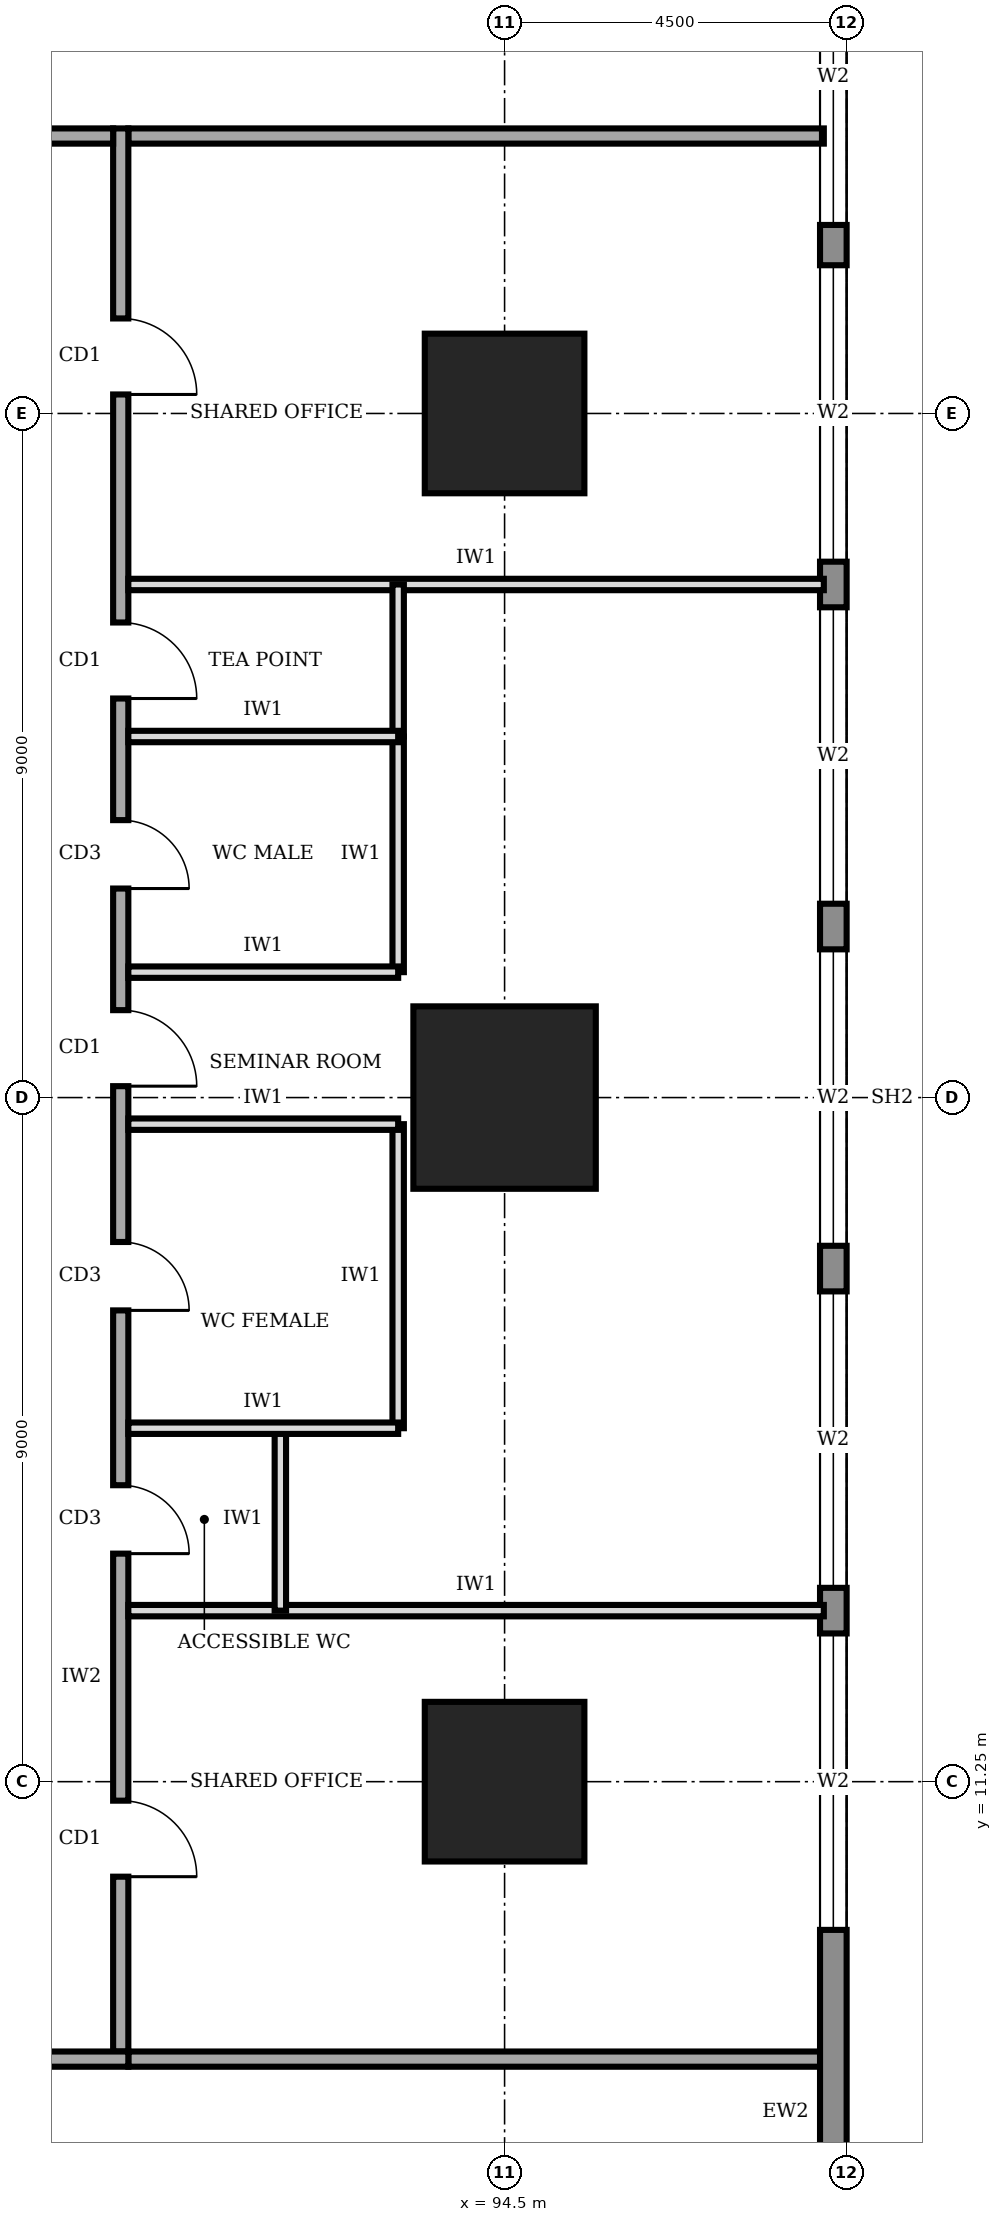
"""IFC4 building model, lengths in metres.
Left out: names, types, materials, properties, quantities, classifications, styles, units other than length and angle.
Written with IfcOpenShell. Run it as: python <this file> out.ifc"""

import sys

from ifc_helpers import new_model, si_unit, direction, frame, frame_2d, origin, origin_2d, place, context, subcontext, project, spatial, rectangle, extrude, element, fill, save


model = new_model("IFC4")
c1 = context("Model", 3, precision=1e-05, world=origin(), true_north=direction((0.0, 1.0)))
c2 = subcontext(c1, "Body", "Model", "MODEL_VIEW")
j1 = project(units=[si_unit("LENGTHUNIT", "METRE"), si_unit("PLANEANGLEUNIT", "RADIAN")], contexts=[c1])
p1 = place(None, origin())
s1 = spatial("IfcSite", under=j1, at=p1, CompositionType="ELEMENT")
p2 = place(p1, origin())
s2 = spatial("IfcBuilding", under=s1, at=p2, CompositionType="ELEMENT")
p3 = place(p2, frame((0.0, 0.0, 65.0)))
s3 = spatial("IfcBuildingStorey", under=s2, at=p3, CompositionType="ELEMENT", Elevation=65.0)
p4 = place(p3, frame((94.5, 11.25, 0.0), z_axis=(0.0, 0.0, 1.0), x_axis=(1.0, 0.0, 0.0)))
e1 = element("IfcColumn", 1, at=p4, inside=s3, PredefinedType="COLUMN", context=c2, shape_type="SweptSolid", body=[
    extrude(rectangle(XDim=2.1, YDim=2.1, at=origin_2d()), origin(), (0.0, 0.0, 1.0), 4.0),
])
p5 = place(p3, frame((94.5, 20.25, 0.0), z_axis=(0.0, 0.0, 1.0), x_axis=(1.0, 0.0, 0.0)))
e2 = element("IfcColumn", 2, at=p5, inside=s3, PredefinedType="COLUMN", context=c2, shape_type="SweptSolid", body=[
    extrude(rectangle(XDim=2.4, YDim=2.4, at=origin_2d()), origin(), (0.0, 0.0, 1.0), 4.0),
])
p6 = place(p3, frame((94.5, 29.25, 0.0), z_axis=(0.0, 0.0, 1.0), x_axis=(1.0, 0.0, 0.0)))
e3 = element("IfcColumn", 3, at=p6, inside=s3, PredefinedType="COLUMN", context=c2, shape_type="SweptSolid", body=[
    extrude(rectangle(XDim=2.1, YDim=2.1, at=origin_2d()), origin(), (0.0, 0.0, 1.0), 4.0),
])
p7 = place(p3, frame((98.825, 4.52, 0.0), z_axis=(0.0, 0.0, 1.0), x_axis=(0.0, 1.0, 0.0)))
e4 = element("IfcWall", 4, at=p7, inside=s3, PredefinedType="STANDARD", context=c2, shape_type="SweptSolid", body=[
    extrude(rectangle(XDim=31.46, YDim=0.35, at=frame_2d((15.73, 0.0))), origin(), (0.0, 0.0, 1.0), 3.75),
])
p8 = place(p7, frame((4.78, 0.0, 0.6)))
e5 = element("IfcOpeningElement", 5, at=p8, cuts=e4, PredefinedType="OPENING", context=c2, shape_type="SweptSolid", body=[
    extrude(rectangle(XDim=3.9, YDim=2.6, at=frame_2d((1.95, 1.3))), frame((0.0, 0.185, 0.0), z_axis=(0.0, -1.0, 0.0), x_axis=(1.0, 0.0, 0.0)), (0.0, 0.0, 1.0), 0.37),
])
p9 = place(p7, frame((9.28, 0.0, 0.6)))
e6 = element("IfcOpeningElement", 6, at=p9, cuts=e4, PredefinedType="OPENING", context=c2, shape_type="SweptSolid", body=[
    extrude(rectangle(XDim=3.9, YDim=2.6, at=frame_2d((1.95, 1.3))), frame((0.0, 0.185, 0.0), z_axis=(0.0, -1.0, 0.0), x_axis=(1.0, 0.0, 0.0)), (0.0, 0.0, 1.0), 0.37),
])
p10 = place(p7, frame((13.78, 0.0, 0.6)))
e7 = element("IfcOpeningElement", 7, at=p10, cuts=e4, PredefinedType="OPENING", context=c2, shape_type="SweptSolid", body=[
    extrude(rectangle(XDim=3.9, YDim=2.6, at=frame_2d((1.95, 1.3))), frame((0.0, 0.185, 0.0), z_axis=(0.0, -1.0, 0.0), x_axis=(1.0, 0.0, 0.0)), (0.0, 0.0, 1.0), 0.37),
])
p11 = place(p7, frame((18.28, 0.0, 0.6)))
e8 = element("IfcOpeningElement", 8, at=p11, cuts=e4, PredefinedType="OPENING", context=c2, shape_type="SweptSolid", body=[
    extrude(rectangle(XDim=3.9, YDim=2.6, at=frame_2d((1.95, 1.3))), frame((0.0, 0.185, 0.0), z_axis=(0.0, -1.0, 0.0), x_axis=(1.0, 0.0, 0.0)), (0.0, 0.0, 1.0), 0.37),
])
p12 = place(p7, frame((22.78, 0.0, 0.6)))
e9 = element("IfcOpeningElement", 9, at=p12, cuts=e4, PredefinedType="OPENING", context=c2, shape_type="SweptSolid", body=[
    extrude(rectangle(XDim=3.9, YDim=2.6, at=frame_2d((1.95, 1.3))), frame((0.0, 0.185, 0.0), z_axis=(0.0, -1.0, 0.0), x_axis=(1.0, 0.0, 0.0)), (0.0, 0.0, 1.0), 0.37),
])
p13 = place(p7, frame((27.21, 0.0, 0.6)))
e10 = element("IfcOpeningElement", 10, at=p13, cuts=e4, PredefinedType="OPENING", context=c2, shape_type="SweptSolid", body=[
    extrude(rectangle(XDim=3.9, YDim=2.6, at=frame_2d((1.95, 1.3))), frame((0.0, 0.185, 0.0), z_axis=(0.0, -1.0, 0.0), x_axis=(1.0, 0.0, 0.0)), (0.0, 0.0, 1.0), 0.37),
])
p14 = place(p3, frame((72.65, 7.6, 0.0), z_axis=(0.0, 0.0, 1.0), x_axis=(1.0, 0.0, 0.0)))
e11 = element("IfcWall", 11, at=p14, inside=s3, PredefinedType="SOLIDWALL", context=c2, shape_type="SweptSolid", body=[
    extrude(rectangle(XDim=16.9, YDim=0.2, at=frame_2d((8.45, 0.0))), origin(), (0.0, 0.0, 1.0), 3.75),
])
p15 = place(p14, frame((3.175, 0.0, 0.0)))
e12 = element("IfcOpeningElement", 12, at=p15, cuts=e11, PredefinedType="OPENING", context=c2, shape_type="SweptSolid", body=[
    extrude(rectangle(XDim=1.8, YDim=2.1, at=frame_2d((0.9, 1.05))), frame((0.0, 0.11, 0.0), z_axis=(0.0, -1.0, 0.0), x_axis=(1.0, 0.0, 0.0)), (0.0, 0.0, 1.0), 0.22),
])
p16 = place(p14, frame((10.1, 0.0, 0.0)))
e13 = element("IfcOpeningElement", 13, at=p16, cuts=e11, PredefinedType="OPENING", context=c2, shape_type="SweptSolid", body=[
    extrude(rectangle(XDim=1.0, YDim=2.1, at=frame_2d((0.5, 1.05))), frame((0.0, 0.11, 0.0), z_axis=(0.0, -1.0, 0.0), x_axis=(1.0, 0.0, 0.0)), (0.0, 0.0, 1.0), 0.22),
])
p17 = place(p14, frame((14.375, 0.0, 0.0)))
e14 = element("IfcOpeningElement", 14, at=p17, cuts=e11, PredefinedType="OPENING", context=c2, shape_type="SweptSolid", body=[
    extrude(rectangle(XDim=1.0, YDim=2.1, at=frame_2d((0.5, 1.05))), frame((0.0, 0.11, 0.0), z_axis=(0.0, -1.0, 0.0), x_axis=(1.0, 0.0, 0.0)), (0.0, 0.0, 1.0), 0.22),
])
p18 = place(p3, frame((89.45, 7.7, 0.0), z_axis=(0.0, 0.0, 1.0), x_axis=(0.0, 1.0, 0.0)))
e15 = element("IfcWall", 15, at=p18, inside=s3, PredefinedType="SOLIDWALL", context=c2, shape_type="SweptSolid", body=[
    extrude(rectangle(XDim=25.3, YDim=0.2, at=frame_2d((12.65, 0.0))), origin(), (0.0, 0.0, 1.0), 3.75),
])
p19 = place(p18, frame((2.3, 0.0, 0.0)))
e16 = element("IfcOpeningElement", 16, at=p19, cuts=e15, PredefinedType="OPENING", context=c2, shape_type="SweptSolid", body=[
    extrude(rectangle(XDim=1.0, YDim=2.1, at=frame_2d((0.5, 1.05))), frame((0.0, 0.11, 0.0), z_axis=(0.0, -1.0, 0.0), x_axis=(1.0, 0.0, 0.0)), (0.0, 0.0, 1.0), 0.22),
])
p20 = place(p18, frame((6.55, 0.0, 0.0)))
e17 = element("IfcOpeningElement", 17, at=p20, cuts=e15, PredefinedType="OPENING", context=c2, shape_type="SweptSolid", body=[
    extrude(rectangle(XDim=0.9, YDim=2.1, at=frame_2d((0.45, 1.05))), frame((0.0, 0.11, 0.0), z_axis=(0.0, -1.0, 0.0), x_axis=(1.0, 0.0, 0.0)), (0.0, 0.0, 1.0), 0.22),
])
p21 = place(p18, frame((9.75, 0.0, 0.0)))
e18 = element("IfcOpeningElement", 18, at=p21, cuts=e15, PredefinedType="OPENING", context=c2, shape_type="SweptSolid", body=[
    extrude(rectangle(XDim=0.9, YDim=2.1, at=frame_2d((0.45, 1.05))), frame((0.0, 0.11, 0.0), z_axis=(0.0, -1.0, 0.0), x_axis=(1.0, 0.0, 0.0)), (0.0, 0.0, 1.0), 0.22),
])
p22 = place(p18, frame((15.3, 0.0, 0.0)))
e19 = element("IfcOpeningElement", 19, at=p22, cuts=e15, PredefinedType="OPENING", context=c2, shape_type="SweptSolid", body=[
    extrude(rectangle(XDim=0.9, YDim=2.1, at=frame_2d((0.45, 1.05))), frame((0.0, 0.11, 0.0), z_axis=(0.0, -1.0, 0.0), x_axis=(1.0, 0.0, 0.0)), (0.0, 0.0, 1.0), 0.22),
])
p23 = place(p18, frame((17.8, 0.0, 0.0)))
e20 = element("IfcOpeningElement", 20, at=p23, cuts=e15, PredefinedType="OPENING", context=c2, shape_type="SweptSolid", body=[
    extrude(rectangle(XDim=1.0, YDim=2.1, at=frame_2d((0.5, 1.05))), frame((0.0, 0.11, 0.0), z_axis=(0.0, -1.0, 0.0), x_axis=(1.0, 0.0, 0.0)), (0.0, 0.0, 1.0), 0.22),
])
p24 = place(p18, frame((12.7, 0.0, 0.0)))
e21 = element("IfcOpeningElement", 21, at=p24, cuts=e15, PredefinedType="OPENING", context=c2, shape_type="SweptSolid", body=[
    extrude(rectangle(XDim=1.0, YDim=2.1, at=frame_2d((0.5, 1.05))), frame((0.0, 0.11, 0.0), z_axis=(0.0, -1.0, 0.0), x_axis=(1.0, 0.0, 0.0)), (0.0, 0.0, 1.0), 0.22),
])
p25 = place(p18, frame((21.8, 0.0, 0.0)))
e22 = element("IfcOpeningElement", 22, at=p25, cuts=e15, PredefinedType="OPENING", context=c2, shape_type="SweptSolid", body=[
    extrude(rectangle(XDim=1.0, YDim=2.1, at=frame_2d((0.5, 1.05))), frame((0.0, 0.11, 0.0), z_axis=(0.0, -1.0, 0.0), x_axis=(1.0, 0.0, 0.0)), (0.0, 0.0, 1.0), 0.22),
])
p26 = place(p3, frame((89.35, 32.9, 0.0), z_axis=(0.0, 0.0, 1.0), x_axis=(-1.0, 0.0, 0.0)))
e23 = element("IfcWall", 23, at=p26, inside=s3, PredefinedType="SOLIDWALL", context=c2, shape_type="SweptSolid", body=[
    extrude(rectangle(XDim=16.9, YDim=0.2, at=frame_2d((8.45, 0.0))), origin(), (0.0, 0.0, 1.0), 3.75),
])
p27 = place(p26, frame((14.375, 0.0, 0.0)))
e24 = element("IfcOpeningElement", 24, at=p27, cuts=e23, PredefinedType="OPENING", context=c2, shape_type="SweptSolid", body=[
    extrude(rectangle(XDim=1.0, YDim=2.1, at=frame_2d((0.5, 1.05))), frame((0.0, 0.11, 0.0), z_axis=(0.0, -1.0, 0.0), x_axis=(1.0, 0.0, 0.0)), (0.0, 0.0, 1.0), 0.22),
])
p28 = place(p26, frame((7.85, 0.0, 0.0)))
e25 = element("IfcOpeningElement", 25, at=p28, cuts=e23, PredefinedType="OPENING", context=c2, shape_type="SweptSolid", body=[
    extrude(rectangle(XDim=1.0, YDim=2.1, at=frame_2d((0.5, 1.05))), frame((0.0, 0.11, 0.0), z_axis=(0.0, -1.0, 0.0), x_axis=(1.0, 0.0, 0.0)), (0.0, 0.0, 1.0), 0.22),
])
p29 = place(p26, frame((1.325, 0.0, 0.0)))
e26 = element("IfcOpeningElement", 26, at=p29, cuts=e23, PredefinedType="OPENING", context=c2, shape_type="SweptSolid", body=[
    extrude(rectangle(XDim=1.0, YDim=2.1, at=frame_2d((0.5, 1.05))), frame((0.0, 0.11, 0.0), z_axis=(0.0, -1.0, 0.0), x_axis=(1.0, 0.0, 0.0)), (0.0, 0.0, 1.0), 0.22),
])
for number, where, z_axis, x_axis in (
    (27, (89.55, 7.6, 0.0), (0.0, 0.0, 1.0), (1.0, 0.0, 0.0)),
    (28, (89.55, 32.9, 0.0), (0.0, 0.0, 1.0), (1.0, 0.0, 0.0)),
):
    element("IfcWall", number, at=place(p3, frame(where, z_axis=z_axis, x_axis=x_axis)), inside=s3, PredefinedType="SOLIDWALL", context=c2, shape_type="SweptSolid", body=[
        extrude(rectangle(XDim=9.15, YDim=0.2, at=frame_2d((4.575, 0.0))), origin(), (0.0, 0.0, 1.0), 3.75),
    ])
for number, where, z_axis, x_axis in (
    (29, (89.55, 13.5, 0.0), (0.0, 0.0, 1.0), (1.0, 0.0, 0.0)),
    (30, (89.55, 27.0, 0.0), (0.0, 0.0, 1.0), (1.0, 0.0, 0.0)),
):
    element("IfcWall", number, at=place(p3, frame(where, z_axis=z_axis, x_axis=x_axis)), inside=s3, PredefinedType="PARTITIONING", context=c2, shape_type="SweptSolid", body=[
        extrude(rectangle(XDim=9.15, YDim=0.15, at=frame_2d((4.575, 0.0))), origin(), (0.0, 0.0, 1.0), 3.75),
    ])
p30 = place(p3, frame((89.55, 15.9, 0.0), z_axis=(0.0, 0.0, 1.0), x_axis=(1.0, 0.0, 0.0)))
e31 = element("IfcWall", 31, at=p30, inside=s3, PredefinedType="PARTITIONING", context=c2, shape_type="SweptSolid", body=[
    extrude(rectangle(XDim=3.55, YDim=0.15, at=frame_2d((1.775, 0.0))), origin(), (0.0, 0.0, 1.0), 3.75),
])
p31 = place(p3, frame((89.55, 19.9, 0.0), z_axis=(0.0, 0.0, 1.0), x_axis=(1.0, 0.0, 0.0)))
e32 = element("IfcWall", 32, at=p31, inside=s3, PredefinedType="PARTITIONING", context=c2, shape_type="SweptSolid", body=[
    extrude(rectangle(XDim=3.55, YDim=0.15, at=frame_2d((1.775, 0.0))), origin(), (0.0, 0.0, 1.0), 2.85),
])
for number, where, z_axis, x_axis in (
    (33, (89.55, 21.9, 0.0), (0.0, 0.0, 1.0), (1.0, 0.0, 0.0)),
    (34, (89.55, 25.0, 0.0), (0.0, 0.0, 1.0), (1.0, 0.0, 0.0)),
):
    element("IfcWall", number, at=place(p3, frame(where, z_axis=z_axis, x_axis=x_axis)), inside=s3, PredefinedType="PARTITIONING", context=c2, shape_type="SweptSolid", body=[
        extrude(rectangle(XDim=3.55, YDim=0.15, at=frame_2d((1.775, 0.0))), origin(), (0.0, 0.0, 1.0), 3.75),
    ])
p32 = place(p3, frame((91.55, 13.5, 0.0), z_axis=(0.0, 0.0, 1.0), x_axis=(0.0, 1.0, 0.0)))
e35 = element("IfcWall", 35, at=p32, inside=s3, PredefinedType="PARTITIONING", context=c2, shape_type="SweptSolid", body=[
    extrude(rectangle(XDim=2.4, YDim=0.15, at=frame_2d((1.2, 0.0))), origin(), (0.0, 0.0, 1.0), 3.75),
])
p33 = place(p3, frame((93.1, 15.9, 0.0), z_axis=(0.0, 0.0, 1.0), x_axis=(0.0, 1.0, 0.0)))
e36 = element("IfcWall", 36, at=p33, inside=s3, PredefinedType="PARTITIONING", context=c2, shape_type="SweptSolid", body=[
    extrude(rectangle(XDim=4.0, YDim=0.15, at=frame_2d((2.0, 0.0))), origin(), (0.0, 0.0, 1.0), 3.75),
])
p34 = place(p3, frame((93.1, 21.9, 0.0), z_axis=(0.0, 0.0, 1.0), x_axis=(0.0, 1.0, 0.0)))
e37 = element("IfcWall", 37, at=p34, inside=s3, PredefinedType="PARTITIONING", context=c2, shape_type="SweptSolid", body=[
    extrude(rectangle(XDim=3.1, YDim=0.15, at=frame_2d((1.55, 0.0))), origin(), (0.0, 0.0, 1.0), 3.75),
])
p35 = place(p3, frame((93.1, 25.0, 0.0), z_axis=(0.0, 0.0, 1.0), x_axis=(0.0, 1.0, 0.0)))
e38 = element("IfcWall", 38, at=p35, inside=s3, PredefinedType="PARTITIONING", context=c2, shape_type="SweptSolid", body=[
    extrude(rectangle(XDim=2.0, YDim=0.15, at=frame_2d((1.0, 0.0))), origin(), (0.0, 0.0, 1.0), 3.75),
])
p36 = place(p8, origin())
e39 = element("IfcWindow", 39, at=p36, inside=s3, PartitioningType="SINGLE_PANEL", PredefinedType="WINDOW", context=c2, shape_type="SweptSolid", body=[
    extrude(rectangle(XDim=3.9, YDim=2.6, at=frame_2d((1.95, 1.3))), frame((0.0, 0.03, 0.0), z_axis=(0.0, -1.0, 0.0), x_axis=(1.0, 0.0, 0.0)), (0.0, 0.0, 1.0), 0.06),
])
fill(e5, e39)
p37 = place(p9, origin())
e40 = element("IfcWindow", 40, at=p37, inside=s3, PartitioningType="SINGLE_PANEL", PredefinedType="WINDOW", context=c2, shape_type="SweptSolid", body=[
    extrude(rectangle(XDim=3.9, YDim=2.6, at=frame_2d((1.95, 1.3))), frame((0.0, 0.03, 0.0), z_axis=(0.0, -1.0, 0.0), x_axis=(1.0, 0.0, 0.0)), (0.0, 0.0, 1.0), 0.06),
])
fill(e6, e40)
p38 = place(p10, origin())
e41 = element("IfcWindow", 41, at=p38, inside=s3, PartitioningType="SINGLE_PANEL", PredefinedType="WINDOW", context=c2, shape_type="SweptSolid", body=[
    extrude(rectangle(XDim=3.9, YDim=2.6, at=frame_2d((1.95, 1.3))), frame((0.0, 0.03, 0.0), z_axis=(0.0, -1.0, 0.0), x_axis=(1.0, 0.0, 0.0)), (0.0, 0.0, 1.0), 0.06),
])
fill(e7, e41)
p39 = place(p11, origin())
e42 = element("IfcWindow", 42, at=p39, inside=s3, PartitioningType="SINGLE_PANEL", PredefinedType="WINDOW", context=c2, shape_type="SweptSolid", body=[
    extrude(rectangle(XDim=3.9, YDim=2.6, at=frame_2d((1.95, 1.3))), frame((0.0, 0.03, 0.0), z_axis=(0.0, -1.0, 0.0), x_axis=(1.0, 0.0, 0.0)), (0.0, 0.0, 1.0), 0.06),
])
fill(e8, e42)
p40 = place(p12, origin())
e43 = element("IfcWindow", 43, at=p40, inside=s3, PartitioningType="SINGLE_PANEL", PredefinedType="WINDOW", context=c2, shape_type="SweptSolid", body=[
    extrude(rectangle(XDim=3.9, YDim=2.6, at=frame_2d((1.95, 1.3))), frame((0.0, 0.03, 0.0), z_axis=(0.0, -1.0, 0.0), x_axis=(1.0, 0.0, 0.0)), (0.0, 0.0, 1.0), 0.06),
])
fill(e9, e43)
p41 = place(p13, origin())
e44 = element("IfcWindow", 44, at=p41, inside=s3, PartitioningType="SINGLE_PANEL", PredefinedType="WINDOW", context=c2, shape_type="SweptSolid", body=[
    extrude(rectangle(XDim=3.9, YDim=2.6, at=frame_2d((1.95, 1.3))), frame((0.0, 0.03, 0.0), z_axis=(0.0, -1.0, 0.0), x_axis=(1.0, 0.0, 0.0)), (0.0, 0.0, 1.0), 0.06),
])
fill(e10, e44)
p42 = place(p19, frame((1.0, 0.0, 0.0), z_axis=(0.0, 0.0, 1.0), x_axis=(-1.0, 0.0, 0.0)))
e45 = element("IfcDoor", 45, at=p42, inside=s3, OperationType="SINGLE_SWING_RIGHT", PredefinedType="DOOR", context=c2, shape_type="SweptSolid", body=[
    extrude(rectangle(XDim=1.0, YDim=2.1, at=frame_2d((0.5, 1.05))), frame((0.0, 0.025, 0.0), z_axis=(0.0, -1.0, 0.0), x_axis=(1.0, 0.0, 0.0)), (0.0, 0.0, 1.0), 0.05),
])
fill(e16, e45)
p43 = place(p20, frame((0.9, 0.0, 0.0), z_axis=(0.0, 0.0, 1.0), x_axis=(-1.0, 0.0, 0.0)))
e46 = element("IfcDoor", 46, at=p43, inside=s3, OperationType="SINGLE_SWING_RIGHT", PredefinedType="DOOR", context=c2, shape_type="SweptSolid", body=[
    extrude(rectangle(XDim=0.9, YDim=2.1, at=frame_2d((0.45, 1.05))), frame((0.0, 0.025, 0.0), z_axis=(0.0, -1.0, 0.0), x_axis=(1.0, 0.0, 0.0)), (0.0, 0.0, 1.0), 0.05),
])
fill(e17, e46)
p44 = place(p21, frame((0.9, 0.0, 0.0), z_axis=(0.0, 0.0, 1.0), x_axis=(-1.0, 0.0, 0.0)))
e47 = element("IfcDoor", 47, at=p44, inside=s3, OperationType="SINGLE_SWING_RIGHT", PredefinedType="DOOR", context=c2, shape_type="SweptSolid", body=[
    extrude(rectangle(XDim=0.9, YDim=2.1, at=frame_2d((0.45, 1.05))), frame((0.0, 0.025, 0.0), z_axis=(0.0, -1.0, 0.0), x_axis=(1.0, 0.0, 0.0)), (0.0, 0.0, 1.0), 0.05),
])
fill(e18, e47)
p45 = place(p22, frame((0.9, 0.0, 0.0), z_axis=(0.0, 0.0, 1.0), x_axis=(-1.0, 0.0, 0.0)))
e48 = element("IfcDoor", 48, at=p45, inside=s3, OperationType="SINGLE_SWING_RIGHT", PredefinedType="DOOR", context=c2, shape_type="SweptSolid", body=[
    extrude(rectangle(XDim=0.9, YDim=2.1, at=frame_2d((0.45, 1.05))), frame((0.0, 0.025, 0.0), z_axis=(0.0, -1.0, 0.0), x_axis=(1.0, 0.0, 0.0)), (0.0, 0.0, 1.0), 0.05),
])
fill(e19, e48)
p46 = place(p23, frame((1.0, 0.0, 0.0), z_axis=(0.0, 0.0, 1.0), x_axis=(-1.0, 0.0, 0.0)))
e49 = element("IfcDoor", 49, at=p46, inside=s3, OperationType="SINGLE_SWING_RIGHT", PredefinedType="DOOR", context=c2, shape_type="SweptSolid", body=[
    extrude(rectangle(XDim=1.0, YDim=2.1, at=frame_2d((0.5, 1.05))), frame((0.0, 0.025, 0.0), z_axis=(0.0, -1.0, 0.0), x_axis=(1.0, 0.0, 0.0)), (0.0, 0.0, 1.0), 0.05),
])
fill(e20, e49)
p47 = place(p24, frame((1.0, 0.0, 0.0), z_axis=(0.0, 0.0, 1.0), x_axis=(-1.0, 0.0, 0.0)))
e50 = element("IfcDoor", 50, at=p47, inside=s3, OperationType="SINGLE_SWING_RIGHT", PredefinedType="DOOR", context=c2, shape_type="SweptSolid", body=[
    extrude(rectangle(XDim=1.0, YDim=2.1, at=frame_2d((0.5, 1.05))), frame((0.0, 0.025, 0.0), z_axis=(0.0, -1.0, 0.0), x_axis=(1.0, 0.0, 0.0)), (0.0, 0.0, 1.0), 0.05),
])
fill(e21, e50)
p48 = place(p25, frame((1.0, 0.0, 0.0), z_axis=(0.0, 0.0, 1.0), x_axis=(-1.0, 0.0, 0.0)))
e51 = element("IfcDoor", 51, at=p48, inside=s3, OperationType="SINGLE_SWING_RIGHT", PredefinedType="DOOR", context=c2, shape_type="SweptSolid", body=[
    extrude(rectangle(XDim=1.0, YDim=2.1, at=frame_2d((0.5, 1.05))), frame((0.0, 0.025, 0.0), z_axis=(0.0, -1.0, 0.0), x_axis=(1.0, 0.0, 0.0)), (0.0, 0.0, 1.0), 0.05),
])
fill(e22, e51)
save(model, sys.argv[1])
